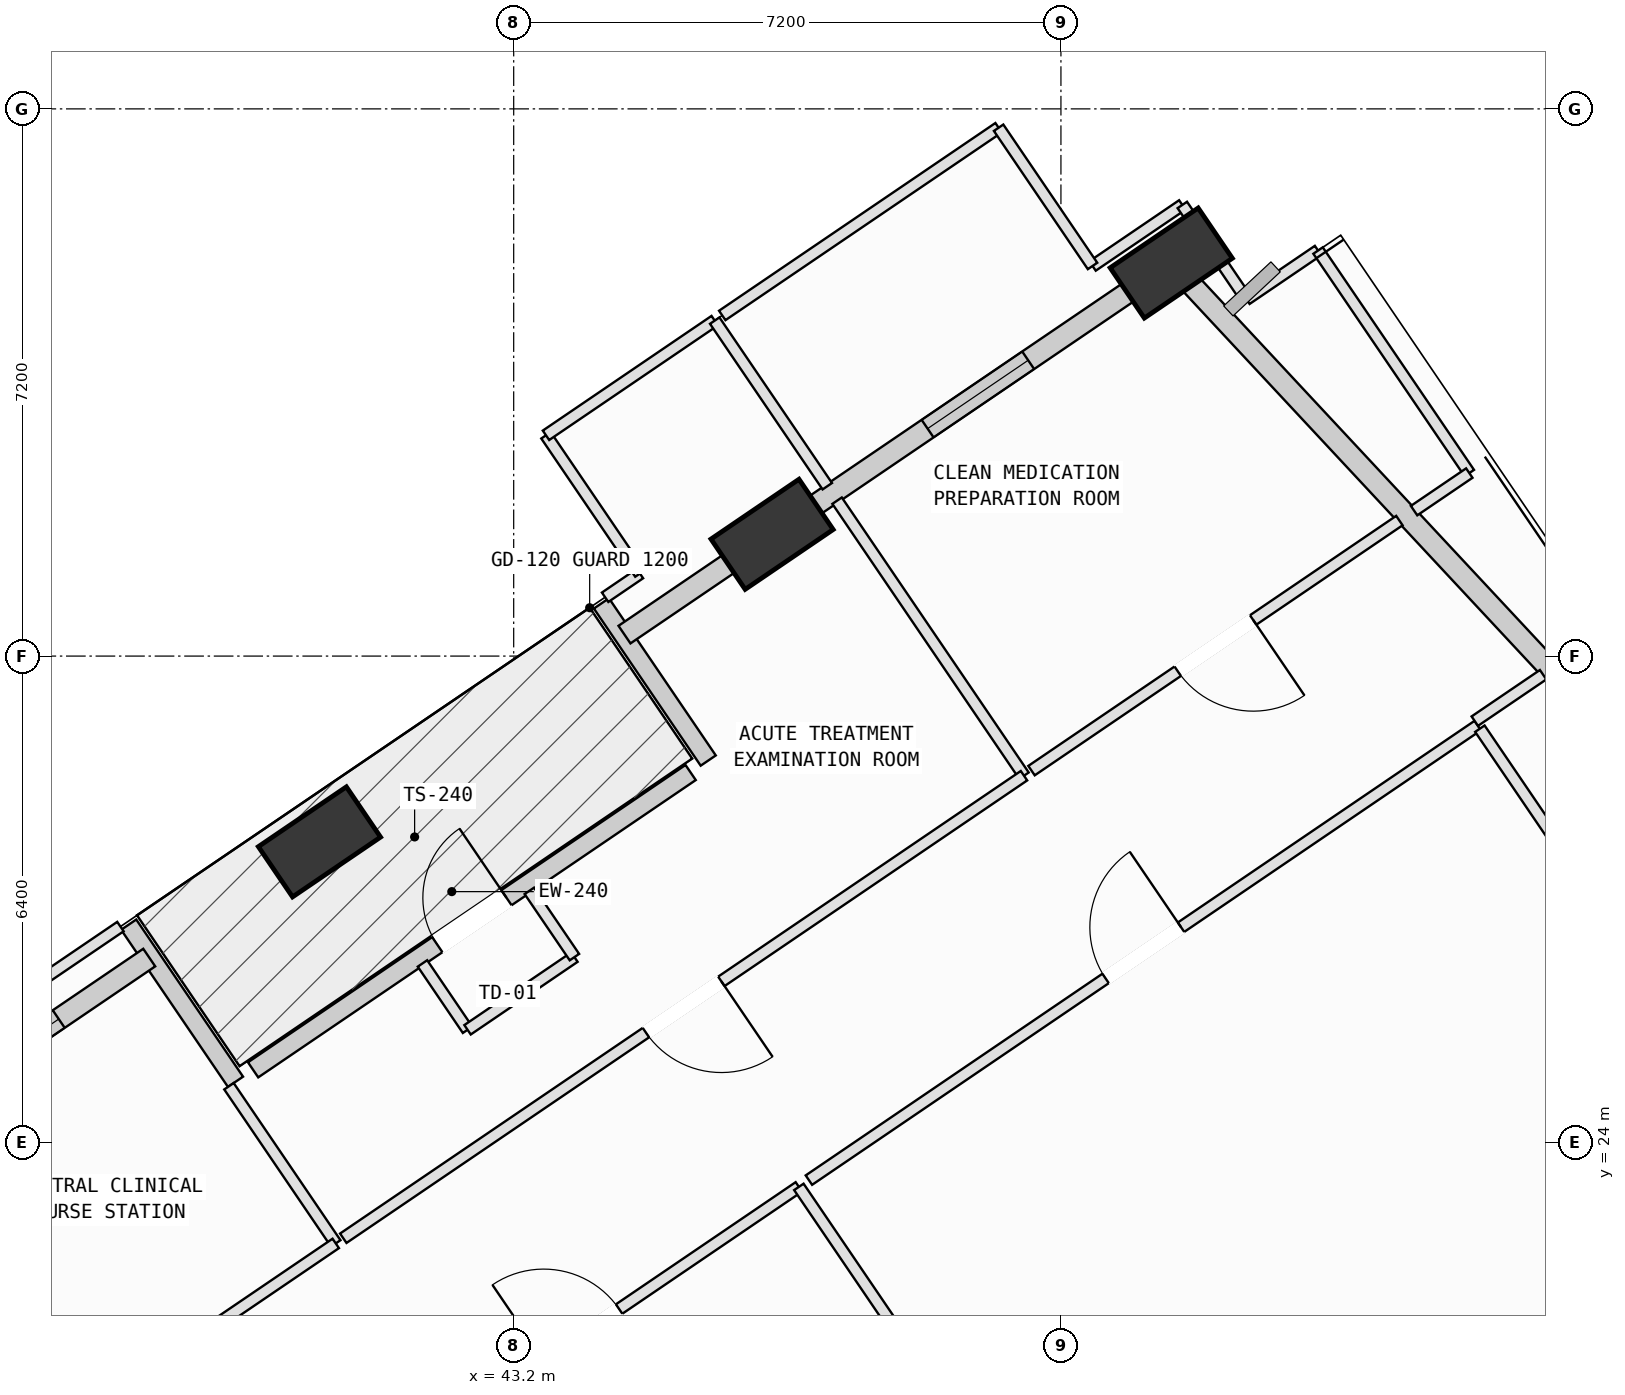
"""IFC4 building model, lengths in metres.
Left out: names, types, materials, properties, quantities, classifications, styles, units other than length and angle.
Written with IfcOpenShell. Run it as: python <this file> out.ifc"""

import sys

from ifc_helpers import new_model, si_unit, direction, frame, frame_2d, origin, origin_2d, place, context, subcontext, project, spatial, rectangle, extrude, element, fill, save


model = new_model("IFC4")
c1 = context("Model", 3, precision=1e-05, world=origin(), true_north=direction((0.0, 1.0)))
c2 = subcontext(c1, "Body", "Model", "MODEL_VIEW")
j1 = project(units=[si_unit("LENGTHUNIT", "METRE"), si_unit("PLANEANGLEUNIT", "RADIAN")], contexts=[c1])
p1 = place(None, origin())
s1 = spatial("IfcSite", under=j1, at=p1, CompositionType="ELEMENT")
p2 = place(p1, origin())
s2 = spatial("IfcBuilding", under=s1, at=p2, CompositionType="ELEMENT")
p3 = place(p2, frame((0.0, 0.0, 169.8)))
s3 = spatial("IfcBuildingStorey", under=s2, at=p3, CompositionType="ELEMENT", Elevation=169.8)
p4 = place(p3, frame((51.852, 35.572, 0.002), z_axis=(-0.045094693959, 0.075036110191, 0.996160655087), x_axis=(-0.420488593526, -0.90596247827, 0.049207018627)))
e1 = element("IfcColumn", 1, at=p4, inside=s3, PredefinedType="COLUMN", context=c2, shape_type="SweptSolid", body=[
    extrude(rectangle(XDim=1.4, YDim=0.8, at=origin_2d()), origin(), (0.0, 0.0, 1.0), 4.012),
])
p5 = place(p3, frame((46.6, 32.002, 0.002), z_axis=(-0.030243842786, 0.05353647977, 0.998107787419), x_axis=(-0.444173384938, -0.895273976304, 0.034561705191)))
e2 = element("IfcColumn", 2, at=p5, inside=s3, PredefinedType="COLUMN", context=c2, shape_type="SweptSolid", body=[
    extrude(rectangle(XDim=1.4, YDim=0.8, at=origin_2d()), origin(), (0.0, 0.0, 1.0), 4.004),
])
p6 = place(p3, frame((40.645, 27.955, 0.002), z_axis=(-0.013311050234, 0.029064495006, 0.999488904927), x_axis=(-0.518042365863, -0.855166206811, 0.017968469588)))
e3 = element("IfcColumn", 3, at=p6, inside=s3, PredefinedType="COLUMN", context=c2, shape_type="SweptSolid", body=[
    extrude(rectangle(XDim=1.4, YDim=0.8, at=origin_2d()), origin(), (0.0, 0.0, 1.0), 3.998),
])
p7 = place(p3, frame((39.771, 24.956, 0.0), z_axis=(0.0, 0.0, 1.0), x_axis=(0.827085007345, 0.562076854731, 0.0)))
e4 = element("IfcWall", 4, at=p7, inside=s3, PredefinedType="SOLIDWALL", context=c2, shape_type="SweptSolid", body=[
    extrude(rectangle(XDim=6.96, YDim=0.24, at=frame_2d((3.48, 0.0))), origin(), (0.0, 0.0, 1.0), 3.065),
])
p8 = place(p7, frame((2.93, 0.0, 0.0)))
e5 = element("IfcOpeningElement", 5, at=p8, cuts=e4, PredefinedType="OPENING", context=c2, shape_type="SweptSolid", body=[
    extrude(rectangle(XDim=1.1, YDim=2.15, at=frame_2d((0.55, 1.075))), frame((0.0, 0.13, 0.0), z_axis=(0.0, -1.0, 0.0), x_axis=(1.0, 0.0, 0.0)), (0.0, 0.0, 1.0), 0.26),
])
p9 = place(p3, frame((38.135, 26.866, 0.0), z_axis=(0.0, 0.0, 1.0), x_axis=(0.562115011853, -0.827059074945, 0.0)))
e6 = element("IfcWall", 6, at=p9, inside=s3, PredefinedType="SOLIDWALL", context=c2, shape_type="SweptSolid", body=[
    extrude(rectangle(XDim=2.5, YDim=0.24, at=frame_2d((1.25, 0.0))), origin(), (0.0, 0.0, 1.0), 3.165),
])
p10 = place(p3, frame((45.76, 29.025, 0.0), z_axis=(0.0, 0.0, 1.0), x_axis=(-0.562048206199, 0.827104475812, 0.0)))
e7 = element("IfcWall", 7, at=p10, inside=s3, PredefinedType="SOLIDWALL", context=c2, shape_type="SweptSolid", body=[
    extrude(rectangle(XDim=2.5, YDim=0.24, at=frame_2d((1.25, 0.0))), origin(), (0.0, 0.0, 1.0), 3.165),
])
p11 = place(p3, frame((52.072, 35.335, 0.0), z_axis=(0.0, 0.0, 1.0), x_axis=(0.681878154304, -0.731465776837, 0.0)))
e8 = element("IfcWall", 8, at=p11, inside=s3, PredefinedType="SOLIDWALL", context=c2, shape_type="SweptSolid", body=[
    extrude(rectangle(XDim=8.838, YDim=0.28, at=frame_2d((4.419, 0.0))), origin(), (0.0, 0.0, 1.0), 3.165),
])
p12 = place(p3, frame((47.006, 32.278, 0.0), z_axis=(0.0, 0.0, 1.0), x_axis=(0.827076028717, 0.562090066379, 0.0)))
e9 = element("IfcWall", 9, at=p12, inside=s3, PredefinedType="SOLIDWALL", context=c2, shape_type="SweptSolid", body=[
    extrude(rectangle(XDim=5.405, YDim=0.28, at=frame_2d((2.702, 0.0))), origin(), (0.0, 0.0, 1.0), 3.165),
])
p13 = place(p12, frame((1.983, 0.0, 0.75)))
e10 = element("IfcOpeningElement", 10, at=p13, cuts=e9, PredefinedType="OPENING", context=c2, shape_type="SweptSolid", body=[
    extrude(rectangle(XDim=1.6, YDim=1.95, at=frame_2d((0.8, 0.975))), frame((0.0, 0.15, 0.0), z_axis=(0.0, -1.0, 0.0), x_axis=(1.0, 0.0, 0.0)), (0.0, 0.0, 1.0), 0.3),
])
p14 = place(p3, frame((44.658, 30.683, 0.0), z_axis=(0.0, 0.0, 1.0), x_axis=(0.82709578115, 0.562061000964, 0.0)))
e11 = element("IfcWall", 11, at=p14, inside=s3, PredefinedType="SOLIDWALL", context=c2, shape_type="SweptSolid", body=[
    extrude(rectangle(XDim=1.877, YDim=0.28, at=frame_2d((0.939, 0.0))), origin(), (0.0, 0.0, 1.0), 3.065),
])
p15 = place(p3, frame((35.109, 24.194, 0.0), z_axis=(0.0, 0.0, 1.0), x_axis=(0.827087163795, 0.562073681545, 0.0)))
e12 = element("IfcWall", 12, at=p15, inside=s3, PredefinedType="SOLIDWALL", context=c2, shape_type="SweptSolid", body=[
    extrude(rectangle(XDim=3.984, YDim=0.28, at=frame_2d((1.992, 0.0))), origin(), (0.0, 0.0, 1.0), 3.165),
])
p16 = place(p15, frame((1.145, 0.0, 0.75)))
e13 = element("IfcOpeningElement", 13, at=p16, cuts=e12, PredefinedType="OPENING", context=c2, shape_type="SweptSolid", body=[
    extrude(rectangle(XDim=1.4, YDim=1.85, at=frame_2d((0.7, 0.925))), frame((0.0, 0.15, 0.0), z_axis=(0.0, -1.0, 0.0), x_axis=(1.0, 0.0, 0.0)), (0.0, 0.0, 1.0), 0.3),
])
p17 = place(p3, frame((41.23, 19.527, 0.0), z_axis=(0.0, 0.0, 1.0), x_axis=(0.827060374775, 0.562113099364, 0.0)))
e14 = element("IfcWall", 14, at=p17, inside=s3, PredefinedType="PARTITIONING", context=c2, shape_type="SweptSolid", body=[
    extrude(rectangle(XDim=6.918, YDim=0.15, at=frame_2d((3.459, 0.0))), origin(), (0.0, 0.0, 1.0), 3.065),
])
p18 = place(p17, frame((2.859, 0.0, 0.0)))
e15 = element("IfcOpeningElement", 15, at=p18, cuts=e14, PredefinedType="OPENING", context=c2, shape_type="SweptSolid", body=[
    extrude(rectangle(XDim=1.2, YDim=2.15, at=frame_2d((0.6, 1.075))), frame((0.0, 0.085, 0.0), z_axis=(0.0, -1.0, 0.0), x_axis=(1.0, 0.0, 0.0)), (0.0, 0.0, 1.0), 0.17),
])
p19 = place(p3, frame((46.952, 23.416, 0.0), z_axis=(0.0, 0.0, 1.0), x_axis=(0.562106478049, -0.827064874926, 0.0)))
e16 = element("IfcWall", 16, at=p19, inside=s3, PredefinedType="PARTITIONING", context=c2, shape_type="SweptSolid", body=[
    extrude(rectangle(XDim=13.485, YDim=0.15, at=frame_2d((6.743, 0.0))), origin(), (0.0, 0.0, 1.0), 3.415),
])
p20 = place(p3, frame((47.084, 23.505, 0.0), z_axis=(0.0, 0.0, 1.0), x_axis=(0.827050244117, 0.562128004734, 0.0)))
e17 = element("IfcWall", 17, at=p20, inside=s3, PredefinedType="PARTITIONING", context=c2, shape_type="SweptSolid", body=[
    extrude(rectangle(XDim=10.64, YDim=0.15, at=frame_2d((5.32, 0.0))), origin(), (0.0, 0.0, 1.0), 3.78),
])
p21 = place(p20, frame((4.72, 0.0, 0.0)))
e18 = element("IfcOpeningElement", 18, at=p21, cuts=e17, PredefinedType="OPENING", context=c2, shape_type="SweptSolid", body=[
    extrude(rectangle(XDim=1.2, YDim=2.15, at=frame_2d((0.6, 1.075))), frame((0.0, 0.085, 0.0), z_axis=(0.0, -1.0, 0.0), x_axis=(1.0, 0.0, 0.0)), (0.0, 0.0, 1.0), 0.17),
])
p22 = place(p3, frame((55.912, 29.445, 0.0), z_axis=(0.0, 0.0, 1.0), x_axis=(0.562088516887, -0.827077081767, 0.0)))
e19 = element("IfcWall", 19, at=p22, inside=s3, PredefinedType="PARTITIONING", context=c2, shape_type="SweptSolid", body=[
    extrude(rectangle(XDim=11.397, YDim=0.15, at=frame_2d((5.698, 0.0))), origin(), (0.0, 0.0, 1.0), 3.78),
])
p23 = place(p22, frame((5.268, 0.0, 0.0)))
e20 = element("IfcOpeningElement", 20, at=p23, cuts=e19, PredefinedType="OPENING", context=c2, shape_type="SweptSolid", body=[
    extrude(rectangle(XDim=0.86, YDim=2.06, at=frame_2d((0.43, 1.03))), frame((0.0, 0.085, 0.0), z_axis=(0.0, -1.0, 0.0), x_axis=(1.0, 0.0, 0.0)), (0.0, 0.0, 1.0), 0.17),
])
p24 = place(p3, frame((29.087, 20.766, 0.0), z_axis=(0.0, 0.0, 1.0), x_axis=(0.82707898546, 0.562085715715, 0.0)))
e21 = element("IfcWall", 21, at=p24, inside=s3, PredefinedType="PARTITIONING", context=c2, shape_type="SweptSolid", body=[
    extrude(rectangle(XDim=10.808, YDim=0.15, at=frame_2d((5.404, 0.0))), origin(), (0.0, 0.0, 1.0), 3.78),
])
p25 = place(p3, frame((39.454, 24.74, 0.0), z_axis=(0.0, 0.0, 1.0), x_axis=(0.561935992116, -0.827180718322, 0.0)))
e22 = element("IfcWall", 22, at=p25, inside=s3, PredefinedType="PARTITIONING", context=c2, shape_type="SweptSolid", body=[
    extrude(rectangle(XDim=2.5, YDim=0.15, at=frame_2d((1.25, 0.0))), origin(), (0.0, 0.0, 1.0), 3.78),
])
p26 = place(p3, frame((40.859, 22.672, 0.0), z_axis=(0.0, 0.0, 1.0), x_axis=(-0.827035400528, -0.562149843257, 0.0)))
e23 = element("IfcWall", 23, at=p26, inside=s3, PredefinedType="PARTITIONING", context=c2, shape_type="SweptSolid", body=[
    extrude(rectangle(XDim=3.544, YDim=0.15, at=frame_2d((1.772, 0.0))), origin(), (0.0, 0.0, 1.0), 3.065),
])
p27 = place(p3, frame((42.0, 26.356, 0.0), z_axis=(0.0, 0.0, 1.0), x_axis=(0.561886022223, -0.827214662606, 0.0)))
e24 = element("IfcWall", 24, at=p27, inside=s3, PredefinedType="PARTITIONING", context=c2, shape_type="SweptSolid", body=[
    extrude(rectangle(XDim=1.055, YDim=0.15, at=frame_2d((0.528, 0.0))), origin(), (0.0, 0.0, 1.0), 3.78),
])
p28 = place(p3, frame((42.593, 25.483, 0.0), z_axis=(0.0, 0.0, 1.0), x_axis=(0.826934514116, 0.562298238805, 0.0)))
e25 = element("IfcWall", 25, at=p28, inside=s3, PredefinedType="PARTITIONING", context=c2, shape_type="SweptSolid", body=[
    extrude(rectangle(XDim=1.7, YDim=0.15, at=frame_2d((0.85, 0.0))), origin(), (0.0, 0.0, 1.0), 3.78),
])
p29 = place(p3, frame((43.999, 26.439, 0.0), z_axis=(0.0, 0.0, 1.0), x_axis=(-0.56231635348, 0.826922196225, 0.0)))
e26 = element("IfcWall", 26, at=p29, inside=s3, PredefinedType="PARTITIONING", context=c2, shape_type="SweptSolid", body=[
    extrude(rectangle(XDim=1.055, YDim=0.15, at=frame_2d((0.527, 0.0))), origin(), (0.0, 0.0, 1.0), 3.78),
])
p30 = place(p3, frame((44.403, 31.174, 0.0), z_axis=(0.0, 0.0, 1.0), x_axis=(0.826450964558, 0.563008706133, 0.0)))
e27 = element("IfcWall", 27, at=p30, inside=s3, PredefinedType="PARTITIONING", context=c2, shape_type="SweptSolid", body=[
    extrude(rectangle(XDim=0.554, YDim=0.15, at=frame_2d((0.277, 0.0))), origin(), (0.0, 0.0, 1.0), 3.165),
])
p31 = place(p3, frame((44.861, 31.486, 0.0), z_axis=(0.0, 0.0, 1.0), x_axis=(-0.562082256039, 0.827081336657, 0.0)))
e28 = element("IfcWall", 28, at=p31, inside=s3, PredefinedType="PARTITIONING", context=c2, shape_type="SweptSolid", body=[
    extrude(rectangle(XDim=2.199, YDim=0.15, at=frame_2d((1.1, 0.0))), origin(), (0.0, 0.0, 1.0), 3.78),
])
p32 = place(p3, frame((43.625, 33.305, 0.0), z_axis=(0.0, 0.0, 1.0), x_axis=(0.8270212231, 0.562170700537, 0.0)))
e29 = element("IfcWall", 29, at=p32, inside=s3, PredefinedType="PARTITIONING", context=c2, shape_type="SweptSolid", body=[
    extrude(rectangle(XDim=2.684, YDim=0.15, at=frame_2d((1.342, 0.0))), origin(), (0.0, 0.0, 1.0), 3.78),
])
p33 = place(p3, frame((45.845, 34.814, 0.0), z_axis=(0.0, 0.0, 1.0), x_axis=(0.562119906759, -0.827055748076, 0.0)))
e30 = element("IfcWall", 30, at=p33, inside=s3, PredefinedType="PARTITIONING", context=c2, shape_type="SweptSolid", body=[
    extrude(rectangle(XDim=2.635, YDim=0.15, at=frame_2d((1.317, 0.0))), origin(), (0.0, 0.0, 1.0), 3.78),
])
p34 = place(p3, frame((47.455, 32.445, 0.0), z_axis=(0.0, 0.0, 1.0), x_axis=(0.561992532426, -0.827142305469, 0.0)))
e31 = element("IfcWall", 31, at=p34, inside=s3, PredefinedType="PARTITIONING", context=c2, shape_type="SweptSolid", body=[
    extrude(rectangle(XDim=4.375, YDim=0.15, at=frame_2d((2.188, 0.0))), origin(), (0.0, 0.0, 1.0), 3.78),
])
p35 = place(p3, frame((49.914, 28.826, 0.0), z_axis=(0.0, 0.0, 1.0), x_axis=(-0.827105946098, -0.562046042535, 0.0)))
e32 = element("IfcWall", 32, at=p35, inside=s3, PredefinedType="PARTITIONING", context=c2, shape_type="SweptSolid", body=[
    extrude(rectangle(XDim=10.828, YDim=0.15, at=frame_2d((5.414, 0.0))), origin(), (0.0, 0.0, 1.0), 3.78),
])
p36 = place(p35, frame((4.814, 0.0, 0.0)))
e33 = element("IfcOpeningElement", 33, at=p36, cuts=e32, PredefinedType="OPENING", context=c2, shape_type="SweptSolid", body=[
    extrude(rectangle(XDim=1.2, YDim=2.15, at=frame_2d((0.6, 1.075))), frame((0.0, 0.085, 0.0), z_axis=(0.0, -1.0, 0.0), x_axis=(1.0, 0.0, 0.0)), (0.0, 0.0, 1.0), 0.17),
])
p37 = place(p3, frame((50.816, 35.533, 0.0), z_axis=(0.0, 0.0, 1.0), x_axis=(0.826993262666, 0.562211831523, 0.0)))
e34 = element("IfcWall", 34, at=p37, inside=s3, PredefinedType="PARTITIONING", context=c2, shape_type="SweptSolid", body=[
    extrude(rectangle(XDim=1.428, YDim=0.15, at=frame_2d((0.714, 0.0))), origin(), (0.0, 0.0, 1.0), 3.165),
])
p38 = place(p3, frame((51.997, 36.336, 0.0), z_axis=(0.0, 0.0, 1.0), x_axis=(0.561927157826, -0.82718671973, 0.0)))
e35 = element("IfcWall", 35, at=p38, inside=s3, PredefinedType="PARTITIONING", context=c2, shape_type="SweptSolid", body=[
    extrude(rectangle(XDim=1.5, YDim=0.15, at=frame_2d((0.75, 0.0))), origin(), (0.0, 0.0, 1.0), 3.165),
])
p39 = place(p3, frame((52.84, 35.095, 0.0), z_axis=(0.0, 0.0, 1.0), x_axis=(0.826942432103, 0.562286594174, 0.0)))
e36 = element("IfcWall", 36, at=p39, inside=s3, PredefinedType="PARTITIONING", context=c2, shape_type="SweptSolid", body=[
    extrude(rectangle(XDim=1.14, YDim=0.15, at=frame_2d((0.57, 0.0))), origin(), (0.0, 0.0, 1.0), 3.78),
])
p40 = place(p3, frame((53.783, 35.736, 0.0), z_axis=(0.0, 0.0, 1.0), x_axis=(0.562110060156, -0.82706244037, 0.0)))
e37 = element("IfcWall", 37, at=p40, inside=s3, PredefinedType="PARTITIONING", context=c2, shape_type="SweptSolid", body=[
    extrude(rectangle(XDim=3.54, YDim=0.15, at=frame_2d((1.77, 0.0))), origin(), (0.0, 0.0, 1.0), 3.78),
])
p41 = place(p3, frame((55.773, 32.808, 0.0), z_axis=(0.0, 0.0, 1.0), x_axis=(-0.82706078244, -0.56211249955, 0.0)))
e38 = element("IfcWall", 38, at=p41, inside=s3, PredefinedType="PARTITIONING", context=c2, shape_type="SweptSolid", body=[
    extrude(rectangle(XDim=0.879, YDim=0.15, at=frame_2d((0.439, 0.0))), origin(), (0.0, 0.0, 1.0), 3.78),
])
p42 = place(p3, frame((54.853, 32.183, 0.0), z_axis=(0.0, 0.0, 1.0), x_axis=(-0.82702347763, -0.562167383836, 0.0)))
e39 = element("IfcWall", 39, at=p42, inside=s3, PredefinedType="PARTITIONING", context=c2, shape_type="SweptSolid", body=[
    extrude(rectangle(XDim=5.853, YDim=0.15, at=frame_2d((2.926, 0.0))), origin(), (0.0, 0.0, 1.0), 3.78),
])
p43 = place(p42, frame((2.326, 0.0, 0.0)))
e40 = element("IfcOpeningElement", 40, at=p43, cuts=e39, PredefinedType="OPENING", context=c2, shape_type="SweptSolid", body=[
    extrude(rectangle(XDim=1.2, YDim=2.15, at=frame_2d((0.6, 1.075))), frame((0.0, 0.085, 0.0), z_axis=(0.0, -1.0, 0.0), x_axis=(1.0, 0.0, 0.0)), (0.0, 0.0, 1.0), 0.17),
])
p44 = place(p3, frame((45.944, 34.882, 0.0), z_axis=(0.0, 0.0, 1.0), x_axis=(0.827190874414, 0.561921041861, 0.0)))
e41 = element("IfcWall", 41, at=p44, inside=s3, PredefinedType="PARTITIONING", context=c2, shape_type="SweptSolid", body=[
    extrude(rectangle(XDim=4.396, YDim=0.15, at=frame_2d((2.198, 0.0))), origin(), (0.0, 0.0, 1.0), 3.78),
])
p45 = place(p3, frame((49.58, 37.352, 0.0), z_axis=(0.0, 0.0, 1.0), x_axis=(0.561954699262, -0.827168009522, 0.0)))
e42 = element("IfcWall", 42, at=p45, inside=s3, PredefinedType="PARTITIONING", context=c2, shape_type="SweptSolid", body=[
    extrude(rectangle(XDim=2.199, YDim=0.15, at=frame_2d((1.1, 0.0))), origin(), (0.0, 0.0, 1.0), 3.78),
])
p46 = place(p3, frame((55.845, 29.544, 0.0), z_axis=(0.0, 0.0, 1.0), x_axis=(0.827005868355, 0.562193288564, 0.0)))
e43 = element("IfcWall", 43, at=p46, inside=s3, PredefinedType="PARTITIONING", context=c2, shape_type="SweptSolid", body=[
    extrude(rectangle(XDim=1.087, YDim=0.15, at=frame_2d((0.543, 0.0))), origin(), (0.0, 0.0, 1.0), 3.78),
])
p47 = place(p8, origin())
e44 = element("IfcDoor", 44, at=p47, inside=s3, OperationType="SINGLE_SWING_RIGHT", PredefinedType="DOOR", context=c2, shape_type="SweptSolid", body=[
    extrude(rectangle(XDim=1.1, YDim=2.15, at=frame_2d((0.55, 1.075))), frame((0.0, 0.025, 0.0), z_axis=(0.0, -1.0, 0.0), x_axis=(1.0, 0.0, 0.0)), (0.0, 0.0, 1.0), 0.05),
])
fill(e5, e44)
p48 = place(p13, origin())
e45 = element("IfcWindow", 45, at=p48, inside=s3, PartitioningType="SINGLE_PANEL", PredefinedType="WINDOW", context=c2, shape_type="SweptSolid", body=[
    extrude(rectangle(XDim=1.6, YDim=1.95, at=frame_2d((0.8, 0.975))), frame((0.0, 0.03, 0.0), z_axis=(0.0, -1.0, 0.0), x_axis=(1.0, 0.0, 0.0)), (0.0, 0.0, 1.0), 0.06),
])
fill(e10, e45)
p49 = place(p16, origin())
e46 = element("IfcWindow", 46, at=p49, inside=s3, PartitioningType="SINGLE_PANEL", PredefinedType="WINDOW", context=c2, shape_type="SweptSolid", body=[
    extrude(rectangle(XDim=1.4, YDim=1.85, at=frame_2d((0.7, 0.925))), frame((0.0, 0.03, 0.0), z_axis=(0.0, -1.0, 0.0), x_axis=(1.0, 0.0, 0.0)), (0.0, 0.0, 1.0), 0.06),
])
fill(e13, e46)
p50 = place(p18, origin())
e47 = element("IfcDoor", 47, at=p50, inside=s3, OperationType="SINGLE_SWING_LEFT", PredefinedType="DOOR", context=c2, shape_type="SweptSolid", body=[
    extrude(rectangle(XDim=1.2, YDim=2.15, at=frame_2d((0.6, 1.075))), frame((0.0, 0.025, 0.0), z_axis=(0.0, -1.0, 0.0), x_axis=(1.0, 0.0, 0.0)), (0.0, 0.0, 1.0), 0.05),
])
fill(e15, e47)
p51 = place(p21, origin())
e48 = element("IfcDoor", 48, at=p51, inside=s3, OperationType="SINGLE_SWING_RIGHT", PredefinedType="DOOR", context=c2, shape_type="SweptSolid", body=[
    extrude(rectangle(XDim=1.2, YDim=2.15, at=frame_2d((0.6, 1.075))), frame((0.0, 0.025, 0.0), z_axis=(0.0, -1.0, 0.0), x_axis=(1.0, 0.0, 0.0)), (0.0, 0.0, 1.0), 0.05),
])
fill(e18, e48)
p52 = place(p36, origin())
e49 = element("IfcDoor", 49, at=p52, inside=s3, OperationType="SINGLE_SWING_LEFT", PredefinedType="DOOR", context=c2, shape_type="SweptSolid", body=[
    extrude(rectangle(XDim=1.2, YDim=2.15, at=frame_2d((0.6, 1.075))), frame((0.0, 0.025, 0.0), z_axis=(0.0, -1.0, 0.0), x_axis=(1.0, 0.0, 0.0)), (0.0, 0.0, 1.0), 0.05),
])
fill(e33, e49)
p53 = place(p43, origin())
e50 = element("IfcDoor", 50, at=p53, inside=s3, OperationType="SINGLE_SWING_LEFT", PredefinedType="DOOR", context=c2, shape_type="SweptSolid", body=[
    extrude(rectangle(XDim=1.2, YDim=2.15, at=frame_2d((0.6, 1.075))), frame((0.0, 0.025, 0.0), z_axis=(0.0, -1.0, 0.0), x_axis=(1.0, 0.0, 0.0)), (0.0, 0.0, 1.0), 0.05),
])
fill(e40, e50)
save(model, sys.argv[1])
